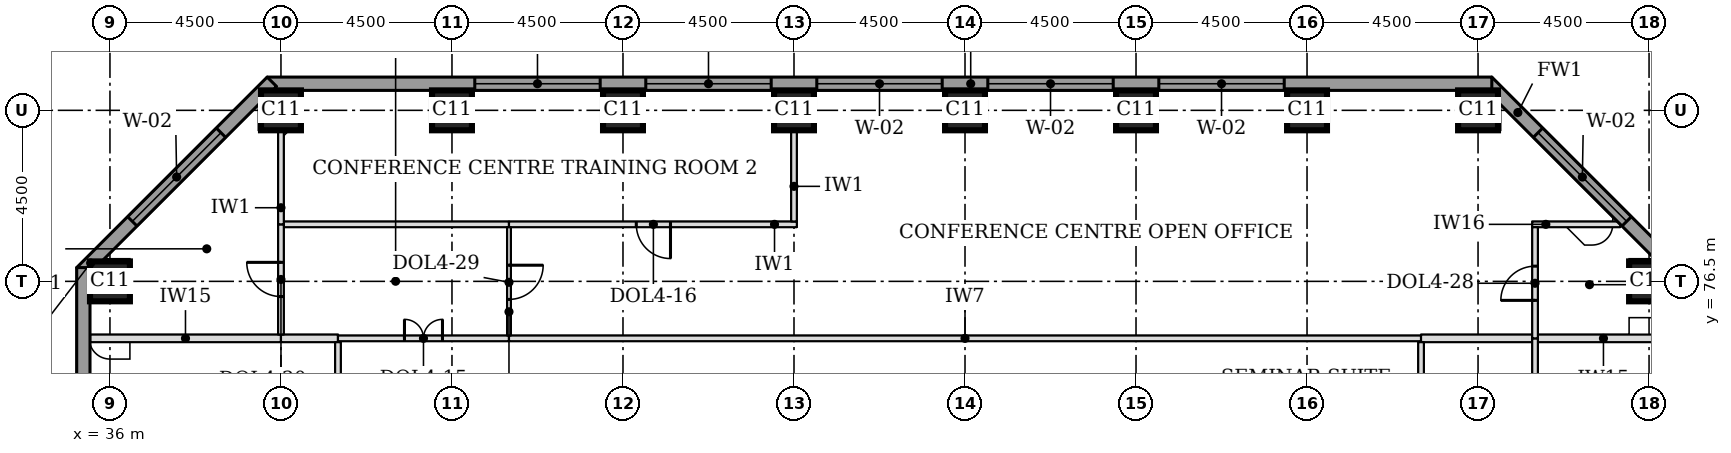
"""IFC4 building model, lengths in metres.
Left out: names, types, materials, properties, quantities, classifications, styles, units other than length and angle.
Written with IfcOpenShell. Run it as: python <this file> out.ifc"""

import sys

from ifc_helpers import new_model, si_unit, direction, frame, frame_2d, origin, origin_2d, place, context, subcontext, project, spatial, rectangle, extrude, element, fill, save


model = new_model("IFC4")
c1 = context("Model", 3, precision=1e-05, world=origin(), true_north=direction((0.0, 1.0)))
c2 = subcontext(c1, "Body", "Model", "MODEL_VIEW")
j1 = project(units=[si_unit("LENGTHUNIT", "METRE"), si_unit("PLANEANGLEUNIT", "RADIAN")], contexts=[c1])
p1 = place(None, origin())
s1 = spatial("IfcSite", under=j1, at=p1, CompositionType="ELEMENT")
p2 = place(p1, origin())
s2 = spatial("IfcBuilding", under=s1, at=p2, CompositionType="ELEMENT")
p3 = place(p2, frame((0.0, 0.0, 101.1)))
s3 = spatial("IfcBuildingStorey", under=s2, at=p3, CompositionType="ELEMENT", Elevation=101.1)
for number, where, z_axis, x_axis in (
    (1, (36.0, 76.5, 0.0), (0.0, 0.0, 1.0), (1.0, 0.0, 0.0)),
    (2, (76.5, 76.5, 0.0), (0.0, 0.0, 1.0), (1.0, 0.0, 0.0)),
    (3, (40.5, 81.0, 0.0), (0.0, 0.0, 1.0), (1.0, 0.0, 0.0)),
    (4, (45.0, 81.0, 0.0), (0.0, 0.0, 1.0), (1.0, 0.0, 0.0)),
    (5, (49.5, 81.0, 0.0), (0.0, 0.0, 1.0), (1.0, 0.0, 0.0)),
    (6, (54.0, 81.0, 0.0), (0.0, 0.0, 1.0), (1.0, 0.0, 0.0)),
    (7, (58.5, 81.0, 0.0), (0.0, 0.0, 1.0), (1.0, 0.0, 0.0)),
    (8, (63.0, 81.0, 0.0), (0.0, 0.0, 1.0), (1.0, 0.0, 0.0)),
    (9, (67.5, 81.0, 0.0), (0.0, 0.0, 1.0), (1.0, 0.0, 0.0)),
    (10, (72.0, 81.0, 0.0), (0.0, 0.0, 1.0), (1.0, 0.0, 0.0)),
):
    element("IfcColumn", number, at=place(p3, frame(where, z_axis=z_axis, x_axis=x_axis)), inside=s3, PredefinedType="COLUMN", context=c2, shape_type="SweptSolid", body=[
        extrude(rectangle(XDim=1.05, YDim=1.05, at=origin_2d()), origin(), (0.0, 0.0, 1.0), 3.7),
    ])
p4 = place(p3, frame((77.251, 76.739, 0.0), z_axis=(0.0, 0.0, 1.0), x_axis=(-0.707106781187, 0.707106781187, 0.0)))
e11 = element("IfcWall", 11, at=p4, inside=s3, PredefinedType="STANDARD", context=c2, shape_type="SweptSolid", body=[
    extrude(rectangle(XDim=7.089, YDim=0.35, at=frame_2d((3.544, 0.0))), origin(), (0.0, 0.0, 1.0), 3.525),
])
p5 = place(p4, frame((1.894, 0.0, 0.9)))
e12 = element("IfcOpeningElement", 12, at=p5, cuts=e11, PredefinedType="OPENING", context=c2, shape_type="SweptSolid", body=[
    extrude(rectangle(XDim=3.3, YDim=1.9, at=frame_2d((1.65, 0.95))), frame((0.0, 0.185, 0.0), z_axis=(0.0, -1.0, 0.0), x_axis=(1.0, 0.0, 0.0)), (0.0, 0.0, 1.0), 0.37),
])
p6 = place(p3, frame((72.362, 81.7, 0.0), z_axis=(0.0, 0.0, 1.0), x_axis=(-1.0, 0.0, 0.0)))
e13 = element("IfcWall", 13, at=p6, inside=s3, PredefinedType="STANDARD", context=c2, shape_type="SweptSolid", body=[
    extrude(rectangle(XDim=32.225, YDim=0.35, at=frame_2d((16.112, 0.0))), origin(), (0.0, 0.0, 1.0), 3.525),
])
p7 = place(p6, frame((5.462, 0.0, 0.9)))
e14 = element("IfcOpeningElement", 14, at=p7, cuts=e13, PredefinedType="OPENING", context=c2, shape_type="SweptSolid", body=[
    extrude(rectangle(XDim=3.3, YDim=1.9, at=frame_2d((1.65, 0.95))), frame((0.0, 0.185, 0.0), z_axis=(0.0, -1.0, 0.0), x_axis=(1.0, 0.0, 0.0)), (0.0, 0.0, 1.0), 0.37),
])
p8 = place(p6, frame((9.962, 0.0, 0.9)))
e15 = element("IfcOpeningElement", 15, at=p8, cuts=e13, PredefinedType="OPENING", context=c2, shape_type="SweptSolid", body=[
    extrude(rectangle(XDim=3.3, YDim=1.9, at=frame_2d((1.65, 0.95))), frame((0.0, 0.185, 0.0), z_axis=(0.0, -1.0, 0.0), x_axis=(1.0, 0.0, 0.0)), (0.0, 0.0, 1.0), 0.37),
])
p9 = place(p6, frame((14.462, 0.0, 0.9)))
e16 = element("IfcOpeningElement", 16, at=p9, cuts=e13, PredefinedType="OPENING", context=c2, shape_type="SweptSolid", body=[
    extrude(rectangle(XDim=3.3, YDim=1.9, at=frame_2d((1.65, 0.95))), frame((0.0, 0.185, 0.0), z_axis=(0.0, -1.0, 0.0), x_axis=(1.0, 0.0, 0.0)), (0.0, 0.0, 1.0), 0.37),
])
p10 = place(p6, frame((18.962, 0.0, 0.9)))
e17 = element("IfcOpeningElement", 17, at=p10, cuts=e13, PredefinedType="OPENING", context=c2, shape_type="SweptSolid", body=[
    extrude(rectangle(XDim=3.3, YDim=1.9, at=frame_2d((1.65, 0.95))), frame((0.0, 0.185, 0.0), z_axis=(0.0, -1.0, 0.0), x_axis=(1.0, 0.0, 0.0)), (0.0, 0.0, 1.0), 0.37),
])
p11 = place(p6, frame((23.462, 0.0, 0.9)))
e18 = element("IfcOpeningElement", 18, at=p11, cuts=e13, PredefinedType="OPENING", context=c2, shape_type="SweptSolid", body=[
    extrude(rectangle(XDim=3.3, YDim=1.9, at=frame_2d((1.65, 0.95))), frame((0.0, 0.185, 0.0), z_axis=(0.0, -1.0, 0.0), x_axis=(1.0, 0.0, 0.0)), (0.0, 0.0, 1.0), 0.37),
])
p12 = place(p3, frame((40.261, 81.751, 0.0), z_axis=(0.0, 0.0, 1.0), x_axis=(-0.707106781187, -0.707106781187, 0.0)))
e19 = element("IfcWall", 19, at=p12, inside=s3, PredefinedType="STANDARD", context=c2, shape_type="SweptSolid", body=[
    extrude(rectangle(XDim=7.089, YDim=0.35, at=frame_2d((3.544, 0.0))), origin(), (0.0, 0.0, 1.0), 3.525),
])
p13 = place(p12, frame((1.894, 0.0, 0.9)))
e20 = element("IfcOpeningElement", 20, at=p13, cuts=e19, PredefinedType="OPENING", context=c2, shape_type="SweptSolid", body=[
    extrude(rectangle(XDim=3.3, YDim=1.9, at=frame_2d((1.65, 0.95))), frame((0.0, 0.185, 0.0), z_axis=(0.0, -1.0, 0.0), x_axis=(1.0, 0.0, 0.0)), (0.0, 0.0, 1.0), 0.37),
])
p14 = place(p3, frame((35.3, 76.862, 0.0), z_axis=(0.0, 0.0, 1.0), x_axis=(0.0, -1.0, 0.0)))
e21 = element("IfcWall", 21, at=p14, inside=s3, PredefinedType="STANDARD", context=c2, shape_type="SweptSolid", body=[
    extrude(rectangle(XDim=13.337, YDim=0.35, at=frame_2d((6.669, 0.0))), origin(), (0.0, 0.0, 1.0), 3.525),
])
p15 = place(p14, frame((9.537, 0.0, 0.9)))
e22 = element("IfcOpeningElement", 22, at=p15, cuts=e21, PredefinedType="OPENING", context=c2, shape_type="SweptSolid", body=[
    extrude(rectangle(XDim=3.3, YDim=1.9, at=frame_2d((1.65, 0.95))), frame((0.0, 0.185, 0.0), z_axis=(0.0, -1.0, 0.0), x_axis=(1.0, 0.0, 0.0)), (0.0, 0.0, 1.0), 0.37),
])
p16 = place(p3, frame((35.475, 75.0, 0.0), z_axis=(0.0, 0.0, 1.0), x_axis=(1.0, 0.0, 0.0)))
e23 = element("IfcWall", 23, at=p16, inside=s3, PredefinedType="PARTITIONING", context=c2, shape_type="SweptSolid", body=[
    extrude(rectangle(XDim=5.025, YDim=0.2, at=frame_2d((2.512, 0.0))), origin(), (0.0, 0.0, 1.0), 3.55),
])
p17 = place(p3, frame((40.5, 75.0, 0.0), z_axis=(0.0, 0.0, 1.0), x_axis=(1.0, 0.0, 0.0)))
e24 = element("IfcWall", 24, at=p17, inside=s3, PredefinedType="PARTITIONING", context=c2, shape_type="SweptSolid", body=[
    extrude(rectangle(XDim=1.5, YDim=0.2, at=frame_2d((0.75, 0.0))), origin(), (0.0, 0.0, 1.0), 3.55),
])
p18 = place(p3, frame((42.0, 75.0, 0.0), z_axis=(0.0, 0.0, 1.0), x_axis=(1.0, 0.0, 0.0)))
e25 = element("IfcWall", 25, at=p18, inside=s3, PredefinedType="PARTITIONING", context=c2, shape_type="SweptSolid", body=[
    extrude(rectangle(XDim=4.5, YDim=0.15, at=frame_2d((2.25, 0.0))), origin(), (0.0, 0.0, 1.0), 3.55),
])
p19 = place(p18, frame((1.75, 0.0, 0.0)))
e26 = element("IfcOpeningElement", 26, at=p19, cuts=e25, PredefinedType="OPENING", context=c2, shape_type="SweptSolid", body=[
    extrude(rectangle(XDim=1.0, YDim=2.1, at=frame_2d((0.5, 1.05))), frame((0.0, 0.085, 0.0), z_axis=(0.0, -1.0, 0.0), x_axis=(1.0, 0.0, 0.0)), (0.0, 0.0, 1.0), 0.17),
])
p20 = place(p3, frame((46.5, 75.0, 0.0), z_axis=(0.0, 0.0, 1.0), x_axis=(1.0, 0.0, 0.0)))
e27 = element("IfcWall", 27, at=p20, inside=s3, PredefinedType="PARTITIONING", context=c2, shape_type="SweptSolid", body=[
    extrude(rectangle(XDim=24.0, YDim=0.15, at=frame_2d((12.0, 0.0))), origin(), (0.0, 0.0, 1.0), 3.55),
])
p21 = place(p3, frame((70.5, 75.0, 0.0), z_axis=(0.0, 0.0, 1.0), x_axis=(1.0, 0.0, 0.0)))
e28 = element("IfcWall", 28, at=p21, inside=s3, PredefinedType="PARTITIONING", context=c2, shape_type="SweptSolid", body=[
    extrude(rectangle(XDim=2.925, YDim=0.2, at=frame_2d((1.462, 0.0))), origin(), (0.0, 0.0, 1.0), 3.55),
])
p22 = place(p3, frame((73.575, 75.0, 0.0), z_axis=(0.0, 0.0, 1.0), x_axis=(1.0, 0.0, 0.0)))
e29 = element("IfcWall", 29, at=p22, inside=s3, PredefinedType="PARTITIONING", context=c2, shape_type="SweptSolid", body=[
    extrude(rectangle(XDim=3.45, YDim=0.2, at=frame_2d((1.725, 0.0))), origin(), (0.0, 0.0, 1.0), 3.55),
])
p23 = place(p3, frame((40.575, 78.0, 0.0), z_axis=(0.0, 0.0, 1.0), x_axis=(1.0, 0.0, 0.0)))
e30 = element("IfcWall", 30, at=p23, inside=s3, PredefinedType="PARTITIONING", context=c2, shape_type="SweptSolid", body=[
    extrude(rectangle(XDim=5.925, YDim=0.15, at=frame_2d((2.962, 0.0))), origin(), (0.0, 0.0, 1.0), 3.55),
])
p24 = place(p3, frame((46.5, 78.0, 0.0), z_axis=(0.0, 0.0, 1.0), x_axis=(1.0, 0.0, 0.0)))
e31 = element("IfcWall", 31, at=p24, inside=s3, PredefinedType="PARTITIONING", context=c2, shape_type="SweptSolid", body=[
    extrude(rectangle(XDim=7.575, YDim=0.15, at=frame_2d((3.788, 0.0))), origin(), (0.0, 0.0, 1.0), 3.55),
])
p25 = place(p24, frame((3.35, 0.0, 0.0)))
e32 = element("IfcOpeningElement", 32, at=p25, cuts=e31, PredefinedType="OPENING", context=c2, shape_type="SweptSolid", body=[
    extrude(rectangle(XDim=0.9, YDim=2.1, at=frame_2d((0.45, 1.05))), frame((0.0, 0.085, 0.0), z_axis=(0.0, -1.0, 0.0), x_axis=(1.0, 0.0, 0.0)), (0.0, 0.0, 1.0), 0.17),
])
p26 = place(p3, frame((73.425, 78.0, 0.0), z_axis=(0.0, 0.0, 1.0), x_axis=(1.0, 0.0, 0.0)))
e33 = element("IfcWall", 33, at=p26, inside=s3, PredefinedType="PARTITIONING", context=c2, shape_type="SweptSolid", body=[
    extrude(rectangle(XDim=2.317, YDim=0.15, at=frame_2d((1.159, 0.0))), origin(), (0.0, 0.0, 1.0), 3.55),
])
p27 = place(p3, frame((42.0, 61.5, 0.0), z_axis=(0.0, 0.0, 1.0), x_axis=(0.0, 1.0, 0.0)))
e34 = element("IfcWall", 34, at=p27, inside=s3, PredefinedType="PARTITIONING", context=c2, shape_type="SweptSolid", body=[
    extrude(rectangle(XDim=13.4, YDim=0.15, at=frame_2d((6.7, 0.0))), origin(), (0.0, 0.0, 1.0), 3.55),
])
p28 = place(p3, frame((70.5, 72.0, 0.0), z_axis=(0.0, 0.0, 1.0), x_axis=(0.0, 1.0, 0.0)))
e35 = element("IfcWall", 35, at=p28, inside=s3, PredefinedType="PARTITIONING", context=c2, shape_type="SweptSolid", body=[
    extrude(rectangle(XDim=2.9, YDim=0.15, at=frame_2d((1.45, 0.0))), origin(), (0.0, 0.0, 1.0), 3.55),
])
p29 = place(p3, frame((73.5, 72.075, 0.0), z_axis=(0.0, 0.0, 1.0), x_axis=(0.0, 1.0, 0.0)))
e36 = element("IfcWall", 36, at=p29, inside=s3, PredefinedType="PARTITIONING", context=c2, shape_type="SweptSolid", body=[
    extrude(rectangle(XDim=2.925, YDim=0.15, at=frame_2d((1.462, 0.0))), origin(), (0.0, 0.0, 1.0), 3.55),
])
p30 = place(p3, frame((73.5, 75.0, 0.0), z_axis=(0.0, 0.0, 1.0), x_axis=(0.0, 1.0, 0.0)))
e37 = element("IfcWall", 37, at=p30, inside=s3, PredefinedType="PARTITIONING", context=c2, shape_type="SweptSolid", body=[
    extrude(rectangle(XDim=2.925, YDim=0.15, at=frame_2d((1.462, 0.0))), origin(), (0.0, 0.0, 1.0), 3.55),
])
p31 = place(p30, frame((1.0, 0.0, 0.0)))
e38 = element("IfcOpeningElement", 38, at=p31, cuts=e37, PredefinedType="OPENING", context=c2, shape_type="SweptSolid", body=[
    extrude(rectangle(XDim=0.9, YDim=2.1, at=frame_2d((0.45, 1.05))), frame((0.0, 0.085, 0.0), z_axis=(0.0, -1.0, 0.0), x_axis=(1.0, 0.0, 0.0)), (0.0, 0.0, 1.0), 0.17),
])
p32 = place(p3, frame((46.5, 75.075, 0.0), z_axis=(0.0, 0.0, 1.0), x_axis=(0.0, 1.0, 0.0)))
e39 = element("IfcWall", 39, at=p32, inside=s3, PredefinedType="PARTITIONING", context=c2, shape_type="SweptSolid", body=[
    extrude(rectangle(XDim=2.85, YDim=0.1, at=frame_2d((1.425, 0.0))), origin(), (0.0, 0.0, 1.0), 3.022),
])
p33 = place(p32, frame((0.95, 0.0, 0.0)))
e40 = element("IfcOpeningElement", 40, at=p33, cuts=e39, PredefinedType="OPENING", context=c2, shape_type="SweptSolid", body=[
    extrude(rectangle(XDim=0.9, YDim=2.1, at=frame_2d((0.45, 1.05))), frame((0.0, 0.06, 0.0), z_axis=(0.0, -1.0, 0.0), x_axis=(1.0, 0.0, 0.0)), (0.0, 0.0, 1.0), 0.12),
])
p34 = place(p3, frame((40.5, 75.1, 0.0), z_axis=(0.0, 0.0, 1.0), x_axis=(0.0, 1.0, 0.0)))
e41 = element("IfcWall", 41, at=p34, inside=s3, PredefinedType="PARTITIONING", context=c2, shape_type="SweptSolid", body=[
    extrude(rectangle(XDim=2.9, YDim=0.15, at=frame_2d((1.45, 0.0))), origin(), (0.0, 0.0, 1.0), 3.55),
])
p35 = place(p34, frame((1.0, 0.0, 0.0)))
e42 = element("IfcOpeningElement", 42, at=p35, cuts=e41, PredefinedType="OPENING", context=c2, shape_type="SweptSolid", body=[
    extrude(rectangle(XDim=0.9, YDim=2.1, at=frame_2d((0.45, 1.05))), frame((0.0, 0.085, 0.0), z_axis=(0.0, -1.0, 0.0), x_axis=(1.0, 0.0, 0.0)), (0.0, 0.0, 1.0), 0.17),
])
p36 = place(p3, frame((40.5, 78.0, 0.0), z_axis=(0.0, 0.0, 1.0), x_axis=(0.0, 1.0, 0.0)))
e43 = element("IfcWall", 43, at=p36, inside=s3, PredefinedType="PARTITIONING", context=c2, shape_type="SweptSolid", body=[
    extrude(rectangle(XDim=2.475, YDim=0.15, at=frame_2d((1.238, 0.0))), origin(), (0.0, 0.0, 1.0), 3.55),
])
p37 = place(p3, frame((54.0, 78.075, 0.0), z_axis=(0.0, 0.0, 1.0), x_axis=(0.0, 1.0, 0.0)))
e44 = element("IfcWall", 44, at=p37, inside=s3, PredefinedType="PARTITIONING", context=c2, shape_type="SweptSolid", body=[
    extrude(rectangle(XDim=3.45, YDim=0.15, at=frame_2d((1.725, 0.0))), origin(), (0.0, 0.0, 1.0), 3.55),
])
p38 = place(p5, origin())
e45 = element("IfcWindow", 45, at=p38, inside=s3, PartitioningType="SINGLE_PANEL", PredefinedType="WINDOW", context=c2, shape_type="SweptSolid", body=[
    extrude(rectangle(XDim=3.3, YDim=1.9, at=frame_2d((1.65, 0.95))), frame((0.0, 0.085, 0.0), z_axis=(0.0, -1.0, 0.0), x_axis=(1.0, 0.0, 0.0)), (0.0, 0.0, 1.0), 0.06),
])
fill(e12, e45)
p39 = place(p7, origin())
e46 = element("IfcWindow", 46, at=p39, inside=s3, PartitioningType="SINGLE_PANEL", PredefinedType="WINDOW", context=c2, shape_type="SweptSolid", body=[
    extrude(rectangle(XDim=3.3, YDim=1.9, at=frame_2d((1.65, 0.95))), frame((0.0, 0.085, 0.0), z_axis=(0.0, -1.0, 0.0), x_axis=(1.0, 0.0, 0.0)), (0.0, 0.0, 1.0), 0.06),
])
fill(e14, e46)
p40 = place(p8, origin())
e47 = element("IfcWindow", 47, at=p40, inside=s3, PartitioningType="SINGLE_PANEL", PredefinedType="WINDOW", context=c2, shape_type="SweptSolid", body=[
    extrude(rectangle(XDim=3.3, YDim=1.9, at=frame_2d((1.65, 0.95))), frame((0.0, 0.085, 0.0), z_axis=(0.0, -1.0, 0.0), x_axis=(1.0, 0.0, 0.0)), (0.0, 0.0, 1.0), 0.06),
])
fill(e15, e47)
p41 = place(p9, origin())
e48 = element("IfcWindow", 48, at=p41, inside=s3, PartitioningType="SINGLE_PANEL", PredefinedType="WINDOW", context=c2, shape_type="SweptSolid", body=[
    extrude(rectangle(XDim=3.3, YDim=1.9, at=frame_2d((1.65, 0.95))), frame((0.0, 0.085, 0.0), z_axis=(0.0, -1.0, 0.0), x_axis=(1.0, 0.0, 0.0)), (0.0, 0.0, 1.0), 0.06),
])
fill(e16, e48)
p42 = place(p10, origin())
e49 = element("IfcWindow", 49, at=p42, inside=s3, PartitioningType="SINGLE_PANEL", PredefinedType="WINDOW", context=c2, shape_type="SweptSolid", body=[
    extrude(rectangle(XDim=3.3, YDim=1.9, at=frame_2d((1.65, 0.95))), frame((0.0, 0.085, 0.0), z_axis=(0.0, -1.0, 0.0), x_axis=(1.0, 0.0, 0.0)), (0.0, 0.0, 1.0), 0.06),
])
fill(e17, e49)
p43 = place(p11, origin())
e50 = element("IfcWindow", 50, at=p43, inside=s3, PartitioningType="SINGLE_PANEL", PredefinedType="WINDOW", context=c2, shape_type="SweptSolid", body=[
    extrude(rectangle(XDim=3.3, YDim=1.9, at=frame_2d((1.65, 0.95))), frame((0.0, 0.085, 0.0), z_axis=(0.0, -1.0, 0.0), x_axis=(1.0, 0.0, 0.0)), (0.0, 0.0, 1.0), 0.06),
])
fill(e18, e50)
p44 = place(p13, origin())
e51 = element("IfcWindow", 51, at=p44, inside=s3, PartitioningType="SINGLE_PANEL", PredefinedType="WINDOW", context=c2, shape_type="SweptSolid", body=[
    extrude(rectangle(XDim=3.3, YDim=1.9, at=frame_2d((1.65, 0.95))), frame((0.0, 0.085, 0.0), z_axis=(0.0, -1.0, 0.0), x_axis=(1.0, 0.0, 0.0)), (0.0, 0.0, 1.0), 0.06),
])
fill(e20, e51)
p45 = place(p19, origin())
e52 = element("IfcDoor", 52, at=p45, inside=s3, OperationType="DOUBLE_DOOR_SINGLE_SWING", PredefinedType="DOOR", context=c2, shape_type="SweptSolid", body=[
    extrude(rectangle(XDim=1.0, YDim=2.1, at=frame_2d((0.5, 1.05))), frame((0.0, 0.025, 0.0), z_axis=(0.0, -1.0, 0.0), x_axis=(1.0, 0.0, 0.0)), (0.0, 0.0, 1.0), 0.05),
])
fill(e26, e52)
p46 = place(p33, frame((0.9, 0.0, 0.0), z_axis=(0.0, 0.0, 1.0), x_axis=(-1.0, 0.0, 0.0)))
e53 = element("IfcDoor", 53, at=p46, inside=s3, OperationType="SINGLE_SWING_LEFT", PredefinedType="DOOR", context=c2, shape_type="SweptSolid", body=[
    extrude(rectangle(XDim=0.9, YDim=2.1, at=frame_2d((0.45, 1.05))), frame((0.0, 0.025, 0.0), z_axis=(0.0, -1.0, 0.0), x_axis=(1.0, 0.0, 0.0)), (0.0, 0.0, 1.0), 0.05),
])
fill(e40, e53)
p47 = place(p31, origin())
e54 = element("IfcDoor", 54, at=p47, inside=s3, OperationType="SINGLE_SWING_LEFT", PredefinedType="DOOR", context=c2, shape_type="SweptSolid", body=[
    extrude(rectangle(XDim=0.9, YDim=2.1, at=frame_2d((0.45, 1.05))), frame((0.0, 0.025, 0.0), z_axis=(0.0, -1.0, 0.0), x_axis=(1.0, 0.0, 0.0)), (0.0, 0.0, 1.0), 0.05),
])
fill(e38, e54)
p48 = place(p35, origin())
e55 = element("IfcDoor", 55, at=p48, inside=s3, OperationType="SINGLE_SWING_RIGHT", PredefinedType="DOOR", context=c2, shape_type="SweptSolid", body=[
    extrude(rectangle(XDim=0.9, YDim=2.1, at=frame_2d((0.45, 1.05))), frame((0.0, 0.025, 0.0), z_axis=(0.0, -1.0, 0.0), x_axis=(1.0, 0.0, 0.0)), (0.0, 0.0, 1.0), 0.05),
])
fill(e42, e55)
p49 = place(p25, frame((0.9, 0.0, 0.0), z_axis=(0.0, 0.0, 1.0), x_axis=(-1.0, 0.0, 0.0)))
e56 = element("IfcDoor", 56, at=p49, inside=s3, OperationType="SINGLE_SWING_LEFT", PredefinedType="DOOR", context=c2, shape_type="SweptSolid", body=[
    extrude(rectangle(XDim=0.9, YDim=2.1, at=frame_2d((0.45, 1.05))), frame((0.0, 0.025, 0.0), z_axis=(0.0, -1.0, 0.0), x_axis=(1.0, 0.0, 0.0)), (0.0, 0.0, 1.0), 0.05),
])
fill(e32, e56)
save(model, sys.argv[1])
